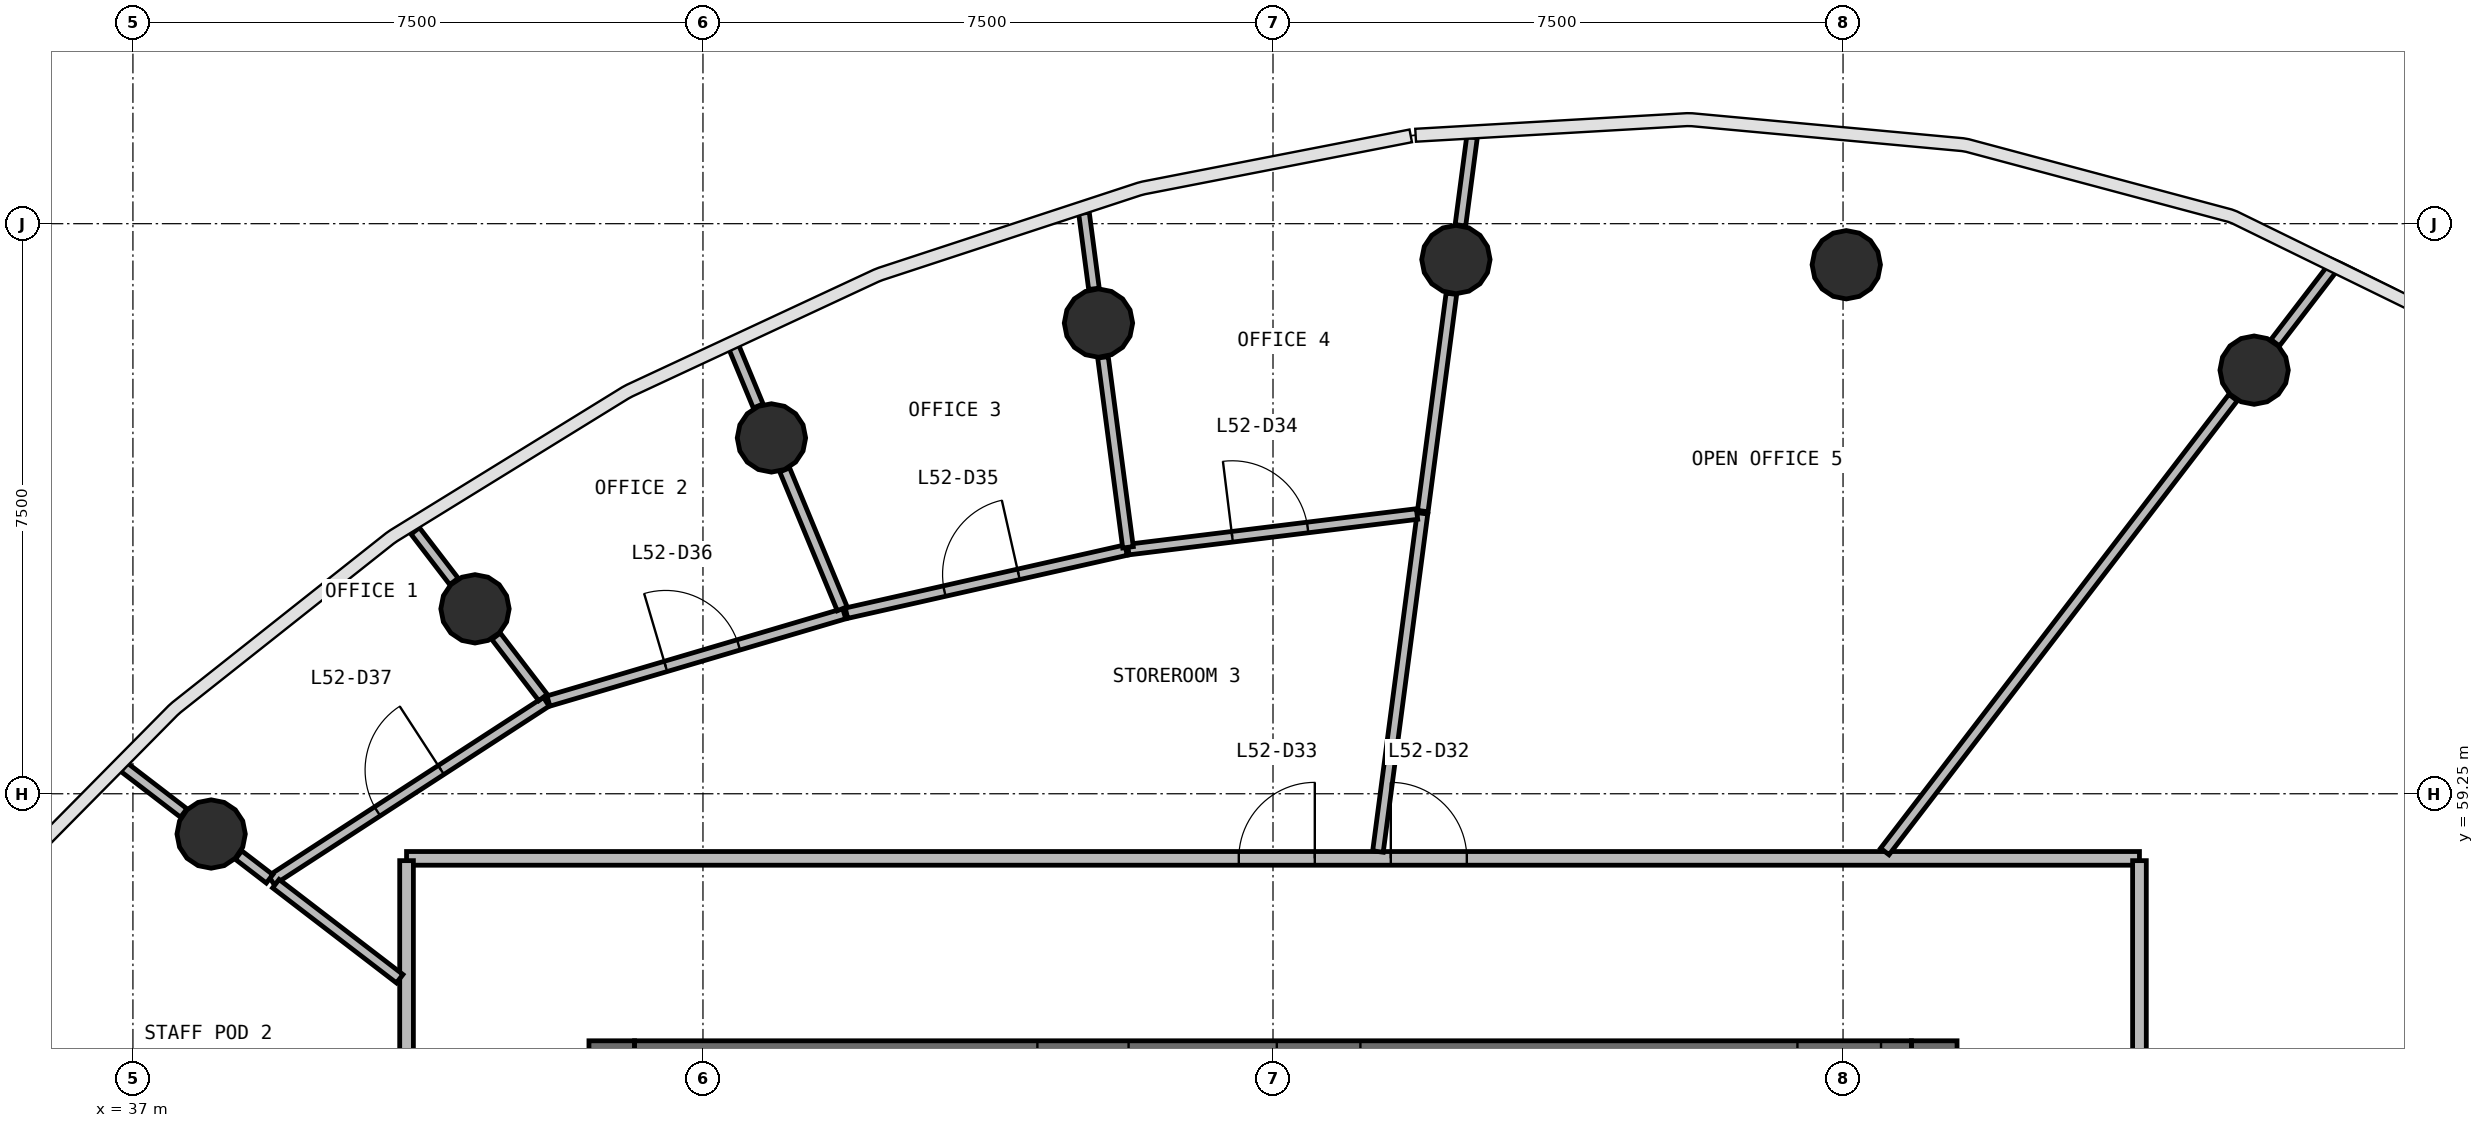
"""IFC4 building model, lengths in metres.
Left out: names, types, materials, properties, quantities, classifications, styles, units other than length and angle.
Written with IfcOpenShell. Run it as: python <this file> out.ifc"""

import sys

from ifc_helpers import new_model, si_unit, direction, frame, frame_2d, origin, origin_2d, place, context, subcontext, project, spatial, rectangle, circle, extrude, source, transform, mapped, element, fill, save


model = new_model("IFC4")
c1 = context("Model", 3, precision=1e-05, world=origin(), true_north=direction((0.0, 1.0)))
c2 = subcontext(c1, "Body", "Model", "MODEL_VIEW")
j1 = project(units=[si_unit("LENGTHUNIT", "METRE"), si_unit("PLANEANGLEUNIT", "RADIAN")], contexts=[c1])
p1 = place(None, origin())
s1 = spatial("IfcSite", under=j1, at=p1, CompositionType="ELEMENT")
p2 = place(p1, origin())
s2 = spatial("IfcBuilding", under=s1, at=p2, CompositionType="ELEMENT")
p3 = place(p2, frame((0.0, 0.0, 215.0)))
s3 = spatial("IfcBuildingStorey", under=s2, at=p3, CompositionType="ELEMENT", Elevation=215.0)
p4 = place(p3, frame((60.7, 40.0, 0.0), z_axis=(0.0, 0.0, 1.0), x_axis=(0.0, 1.0, 0.0)))
e1 = element("IfcWall", 1, at=p4, inside=s3, PredefinedType="SHEAR", context=c2, shape_type="SweptSolid", body=[
    extrude(rectangle(XDim=16.0, YDim=0.6, at=frame_2d((8.0, 0.0))), origin(), (0.0, 0.0, 1.0), 3.9),
])
p5 = place(p4, frame((7.1, 0.0, 0.0)))
e2 = element("IfcOpeningElement", 2, at=p5, cuts=e1, PredefinedType="OPENING", context=c2, shape_type="SweptSolid", body=[
    extrude(rectangle(XDim=1.8, YDim=2.1, at=frame_2d((0.9, 1.05))), frame((0.0, 0.31, 0.0), z_axis=(0.0, -1.0, 0.0), x_axis=(1.0, 0.0, 0.0)), (0.0, 0.0, 1.0), 0.62),
])
p6 = place(p3, frame((43.3, 56.0, 0.0), z_axis=(0.0, 0.0, 1.0), x_axis=(0.0, -1.0, 0.0)))
e3 = element("IfcWall", 3, at=p6, inside=s3, PredefinedType="SHEAR", context=c2, shape_type="SweptSolid", body=[
    extrude(rectangle(XDim=16.0, YDim=0.6, at=frame_2d((8.0, 0.0))), origin(), (0.0, 0.0, 1.0), 3.9),
])
p7 = place(p6, frame((7.1, 0.0, 0.0)))
e4 = element("IfcOpeningElement", 4, at=p7, cuts=e3, PredefinedType="OPENING", context=c2, shape_type="SweptSolid", body=[
    extrude(rectangle(XDim=1.8, YDim=2.1, at=frame_2d((0.9, 1.05))), frame((0.0, 0.31, 0.0), z_axis=(0.0, -1.0, 0.0), x_axis=(1.0, 0.0, 0.0)), (0.0, 0.0, 1.0), 0.62),
])
p8 = place(p3, frame((60.4, 55.7, 0.0), z_axis=(0.0, 0.0, 1.0), x_axis=(-1.0, 0.0, 0.0)))
e5 = element("IfcWall", 5, at=p8, inside=s3, PredefinedType="SHEAR", context=c2, shape_type="SweptSolid", body=[
    extrude(rectangle(XDim=16.8, YDim=0.6, at=frame_2d((8.4, 0.0))), origin(), (0.0, 0.0, 1.0), 3.9),
])
p9 = place(p8, frame((0.4, 0.0, 0.0)))
e6 = element("IfcOpeningElement", 6, at=p9, cuts=e5, PredefinedType="OPENING", context=c2, shape_type="SweptSolid", body=[
    extrude(rectangle(XDim=1.1, YDim=2.1, at=frame_2d((0.55, 1.05))), frame((0.0, 0.31, 0.0), z_axis=(0.0, -1.0, 0.0), x_axis=(1.0, 0.0, 0.0)), (0.0, 0.0, 1.0), 0.62),
])
p10 = place(p8, frame((10.3, 0.0, 0.0)))
e7 = element("IfcOpeningElement", 7, at=p10, cuts=e5, PredefinedType="OPENING", context=c2, shape_type="SweptSolid", body=[
    extrude(rectangle(XDim=1.2, YDim=2.1, at=frame_2d((0.6, 1.05))), frame((0.0, 0.31, 0.0), z_axis=(0.0, -1.0, 0.0), x_axis=(1.0, 0.0, 0.0)), (0.0, 0.0, 1.0), 0.62),
])
p11 = place(p8, frame((7.25, 0.0, 0.0)))
e8 = element("IfcOpeningElement", 8, at=p11, cuts=e5, PredefinedType="OPENING", context=c2, shape_type="SweptSolid", body=[
    extrude(rectangle(XDim=1.1, YDim=2.1, at=frame_2d((0.55, 1.05))), frame((0.0, 0.31, 0.0), z_axis=(0.0, -1.0, 0.0), x_axis=(1.0, 0.0, 0.0)), (0.0, 0.0, 1.0), 0.62),
])
m1 = source(origin(), c2, "Body", "SweptSolid", [
    extrude(circle(Radius=0.45, at=origin_2d()), origin(), (0.0, 0.0, 1.0), 3.9),
])
for number, where, z_axis, x_axis in (
    (9, (64.909, 64.823, 0.0), (0.0, 0.0, 1.0), (1.0, 0.0, 0.0)),
    (10, (59.543, 66.21, 0.0), (0.0, 0.0, 1.0), (1.0, 0.0, 0.0)),
    (11, (54.406, 66.278, 0.0), (0.0, 0.0, 1.0), (1.0, 0.0, 0.0)),
    (12, (49.704, 65.442, 0.0), (0.0, 0.0, 1.0), (1.0, 0.0, 0.0)),
    (13, (45.401, 63.931, 0.0), (0.0, 0.0, 1.0), (1.0, 0.0, 0.0)),
    (14, (41.501, 61.683, 0.0), (0.0, 0.0, 1.0), (1.0, 0.0, 0.0)),
    (15, (38.029, 58.72, 0.0), (0.0, 0.0, 1.0), (1.0, 0.0, 0.0)),
):
    element("IfcColumn", number, at=place(p3, frame(where, z_axis=z_axis, x_axis=x_axis)), inside=s3, PredefinedType="COLUMN", context=c2, shape_type="MappedRepresentation", body=[
        mapped(m1, transform((0.0, 0.0, 0.0), scale=1.0)),
    ])
p12 = place(p3, frame((40.6, 58.4, 0.0), z_axis=(0.0, 0.0, 1.0), x_axis=(1.0, 0.0, 0.0)))
e16 = element("IfcWall", 16, at=p12, inside=s3, PredefinedType="PARTITIONING", context=c2, shape_type="SweptSolid", body=[
    extrude(rectangle(XDim=22.8, YDim=0.18, at=frame_2d((11.4, 0.0))), origin(), (0.0, 0.0, 1.0), 2.88),
])
p13 = place(p12, frame((12.95, 0.0, 0.0)))
e17 = element("IfcOpeningElement", 17, at=p13, cuts=e16, PredefinedType="OPENING", context=c2, shape_type="SweptSolid", body=[
    extrude(rectangle(XDim=1.0, YDim=2.1, at=frame_2d((0.5, 1.05))), frame((0.0, 0.1, 0.0), z_axis=(0.0, -1.0, 0.0), x_axis=(1.0, 0.0, 0.0)), (0.0, 0.0, 1.0), 0.2),
])
p14 = place(p12, frame((10.95, 0.0, 0.0)))
e18 = element("IfcOpeningElement", 18, at=p14, cuts=e16, PredefinedType="OPENING", context=c2, shape_type="SweptSolid", body=[
    extrude(rectangle(XDim=1.0, YDim=2.1, at=frame_2d((0.5, 1.05))), frame((0.0, 0.1, 0.0), z_axis=(0.0, -1.0, 0.0), x_axis=(1.0, 0.0, 0.0)), (0.0, 0.0, 1.0), 0.2),
])
p15 = place(p3, frame((63.4, 58.37, 0.0), z_axis=(0.0, 0.0, 1.0), x_axis=(0.0, -1.0, 0.0)))
e19 = element("IfcWall", 19, at=p15, inside=s3, PredefinedType="PARTITIONING", context=c2, shape_type="SweptSolid", body=[
    extrude(rectangle(XDim=20.74, YDim=0.18, at=frame_2d((10.37, 0.0))), origin(), (0.0, 0.0, 1.0), 2.88),
])
p16 = place(p15, frame((12.09, 0.0, 0.0)))
e20 = element("IfcOpeningElement", 20, at=p16, cuts=e19, PredefinedType="OPENING", context=c2, shape_type="SweptSolid", body=[
    extrude(rectangle(XDim=1.0, YDim=2.1, at=frame_2d((0.5, 1.05))), frame((0.0, 0.1, 0.0), z_axis=(0.0, -1.0, 0.0), x_axis=(1.0, 0.0, 0.0)), (0.0, 0.0, 1.0), 0.2),
])
p17 = place(p15, frame((9.89, 0.0, 0.0)))
e21 = element("IfcOpeningElement", 21, at=p17, cuts=e19, PredefinedType="OPENING", context=c2, shape_type="SweptSolid", body=[
    extrude(rectangle(XDim=1.0, YDim=2.1, at=frame_2d((0.5, 1.05))), frame((0.0, 0.1, 0.0), z_axis=(0.0, -1.0, 0.0), x_axis=(1.0, 0.0, 0.0)), (0.0, 0.0, 1.0), 0.2),
])
p18 = place(p15, frame((4.29, 0.0, 0.0)))
e22 = element("IfcOpeningElement", 22, at=p18, cuts=e19, PredefinedType="OPENING", context=c2, shape_type="SweptSolid", body=[
    extrude(rectangle(XDim=1.0, YDim=2.1, at=frame_2d((0.5, 1.05))), frame((0.0, 0.1, 0.0), z_axis=(0.0, -1.0, 0.0), x_axis=(1.0, 0.0, 0.0)), (0.0, 0.0, 1.0), 0.2),
])
p19 = place(p3, frame((40.6, 37.63, 0.0), z_axis=(0.0, 0.0, 1.0), x_axis=(0.0, 1.0, 0.0)))
e23 = element("IfcWall", 23, at=p19, inside=s3, PredefinedType="PARTITIONING", context=c2, shape_type="SweptSolid", body=[
    extrude(rectangle(XDim=20.74, YDim=0.18, at=frame_2d((10.37, 0.0))), origin(), (0.0, 0.0, 1.0), 2.88),
])
p20 = place(p19, frame((15.49, 0.0, 0.0)))
e24 = element("IfcOpeningElement", 24, at=p20, cuts=e23, PredefinedType="OPENING", context=c2, shape_type="SweptSolid", body=[
    extrude(rectangle(XDim=1.0, YDim=2.1, at=frame_2d((0.5, 1.05))), frame((0.0, 0.1, 0.0), z_axis=(0.0, -1.0, 0.0), x_axis=(1.0, 0.0, 0.0)), (0.0, 0.0, 1.0), 0.2),
])
p21 = place(p19, frame((9.89, 0.0, 0.0)))
e25 = element("IfcOpeningElement", 25, at=p21, cuts=e23, PredefinedType="OPENING", context=c2, shape_type="SweptSolid", body=[
    extrude(rectangle(XDim=1.0, YDim=2.1, at=frame_2d((0.5, 1.05))), frame((0.0, 0.1, 0.0), z_axis=(0.0, -1.0, 0.0), x_axis=(1.0, 0.0, 0.0)), (0.0, 0.0, 1.0), 0.2),
])
p22 = place(p3, frame((63.49, 52.759, 0.0), z_axis=(0.0, 0.0, 1.0), x_axis=(0.923877866197, 0.382687455178, 0.0)))
e26 = element("IfcWall", 26, at=p22, inside=s3, PredefinedType="PARTITIONING", context=c2, shape_type="SweptSolid", body=[
    extrude(rectangle(XDim=9.571, YDim=0.14, at=frame_2d((4.786, 0.0))), origin(), (0.0, 0.0, 1.0), 2.88),
])
p23 = place(p3, frame((60.049, 58.49, 0.0), z_axis=(0.0, 0.0, 1.0), x_axis=(0.608758977351, 0.793355221508, 0.0)))
e27 = element("IfcWall", 27, at=p23, inside=s3, PredefinedType="PARTITIONING", context=c2, shape_type="SweptSolid", body=[
    extrude(rectangle(XDim=7.528, YDim=0.14, at=frame_2d((3.764, 0.0))), origin(), (0.0, 0.0, 1.0), 2.88),
])
p24 = place(p3, frame((53.381, 58.49, 0.0), z_axis=(0.0, 0.0, 1.0), x_axis=(0.130513619035, 0.991446516584, 0.0)))
e28 = element("IfcWall", 28, at=p24, inside=s3, PredefinedType="PARTITIONING", context=c2, shape_type="SweptSolid", body=[
    extrude(rectangle(XDim=4.488, YDim=0.14, at=frame_2d((2.244, 0.0))), origin(), (0.0, 0.0, 1.0), 2.88),
])
p25 = place(p3, frame((38.821, 58.112, 0.0), z_axis=(0.0, 0.0, 1.0), x_axis=(0.838669882541, 0.544640090444, 0.0)))
e29 = element("IfcWall", 29, at=p25, inside=s3, PredefinedType="PARTITIONING", context=c2, shape_type="SweptSolid", body=[
    extrude(rectangle(XDim=4.313, YDim=0.14, at=frame_2d((2.156, 0.0))), origin(), (0.0, 0.0, 1.0), 2.88),
])
p26 = place(p25, frame((1.663, 0.0, 0.0)))
e30 = element("IfcOpeningElement", 30, at=p26, cuts=e29, PredefinedType="OPENING", context=c2, shape_type="SweptSolid", body=[
    extrude(rectangle(XDim=1.0, YDim=2.1, at=frame_2d((0.5, 1.05))), frame((0.0, 0.08, 0.0), z_axis=(0.0, -1.0, 0.0), x_axis=(1.0, 0.0, 0.0)), (0.0, 0.0, 1.0), 0.16),
])
p27 = place(p3, frame((42.467, 60.47, 0.0), z_axis=(0.0, 0.0, 1.0), x_axis=(0.959068964017, 0.283172601532, 0.0)))
e31 = element("IfcWall", 31, at=p27, inside=s3, PredefinedType="PARTITIONING", context=c2, shape_type="SweptSolid", body=[
    extrude(rectangle(XDim=4.058, YDim=0.14, at=frame_2d((2.029, 0.0))), origin(), (0.0, 0.0, 1.0), 2.88),
])
p28 = place(p27, frame((1.608, 0.0, 0.0)))
e32 = element("IfcOpeningElement", 32, at=p28, cuts=e31, PredefinedType="OPENING", context=c2, shape_type="SweptSolid", body=[
    extrude(rectangle(XDim=1.0, YDim=2.1, at=frame_2d((0.5, 1.05))), frame((0.0, 0.08, 0.0), z_axis=(0.0, -1.0, 0.0), x_axis=(1.0, 0.0, 0.0)), (0.0, 0.0, 1.0), 0.16),
])
p29 = place(p3, frame((50.096, 62.462, 0.0), z_axis=(0.0, 0.0, 1.0), x_axis=(0.992497085358, 0.122268293338, 0.0)))
e33 = element("IfcWall", 33, at=p29, inside=s3, PredefinedType="PARTITIONING", context=c2, shape_type="SweptSolid", body=[
    extrude(rectangle(XDim=3.828, YDim=0.14, at=frame_2d((1.914, 0.0))), origin(), (0.0, 0.0, 1.0), 2.88),
])
p30 = place(p29, frame((1.378, 0.0, 0.0)))
e34 = element("IfcOpeningElement", 34, at=p30, cuts=e33, PredefinedType="OPENING", context=c2, shape_type="SweptSolid", body=[
    extrude(rectangle(XDim=1.0, YDim=2.1, at=frame_2d((0.5, 1.05))), frame((0.0, 0.08, 0.0), z_axis=(0.0, -1.0, 0.0), x_axis=(1.0, 0.0, 0.0)), (0.0, 0.0, 1.0), 0.16),
])
p31 = place(p3, frame((46.388, 61.625, 0.0), z_axis=(0.0, 0.0, 1.0), x_axis=(0.975458049839, 0.220185360556, 0.0)))
e35 = element("IfcWall", 35, at=p31, inside=s3, PredefinedType="PARTITIONING", context=c2, shape_type="SweptSolid", body=[
    extrude(rectangle(XDim=3.771, YDim=0.14, at=frame_2d((1.885, 0.0))), origin(), (0.0, 0.0, 1.0), 2.88),
])
p32 = place(p31, frame((1.321, 0.0, 0.0)))
e36 = element("IfcOpeningElement", 36, at=p32, cuts=e35, PredefinedType="OPENING", context=c2, shape_type="SweptSolid", body=[
    extrude(rectangle(XDim=1.0, YDim=2.1, at=frame_2d((0.5, 1.05))), frame((0.0, 0.08, 0.0), z_axis=(0.0, -1.0, 0.0), x_axis=(1.0, 0.0, 0.0)), (0.0, 0.0, 1.0), 0.16),
])
p33 = place(p3, frame((53.971, 62.969, 0.0), z_axis=(0.0, 0.0, 1.0), x_axis=(0.130566218239, 0.991439591026, 0.0)))
e37 = element("IfcWall", 37, at=p33, inside=s3, PredefinedType="PARTITIONING", context=c2, shape_type="SweptSolid", body=[
    extrude(rectangle(XDim=2.883, YDim=0.14, at=frame_2d((1.442, 0.0))), origin(), (0.0, 0.0, 1.0), 2.88),
])
p34 = place(p3, frame((50.092, 62.492, 0.0), z_axis=(0.0, 0.0, 1.0), x_axis=(-0.130527151373, 0.991444735098, 0.0)))
e38 = element("IfcWall", 38, at=p34, inside=s3, PredefinedType="PARTITIONING", context=c2, shape_type="SweptSolid", body=[
    extrude(rectangle(XDim=2.521, YDim=0.14, at=frame_2d((1.261, 0.0))), origin(), (0.0, 0.0, 1.0), 2.88),
])
p35 = place(p3, frame((40.51, 56.817, 0.0), z_axis=(0.0, 0.0, 1.0), x_axis=(-0.793392079692, 0.608710939512, 0.0)))
e39 = element("IfcWall", 39, at=p35, inside=s3, PredefinedType="PARTITIONING", context=c2, shape_type="SweptSolid", body=[
    extrude(rectangle(XDim=2.054, YDim=0.14, at=frame_2d((1.027, 0.0))), origin(), (0.0, 0.0, 1.0), 2.88),
])
p36 = place(p3, frame((46.332, 61.684, 0.0), z_axis=(0.0, 0.0, 1.0), x_axis=(-0.382686140255, 0.923878410862, 0.0)))
e40 = element("IfcWall", 40, at=p36, inside=s3, PredefinedType="PARTITIONING", context=c2, shape_type="SweptSolid", body=[
    extrude(rectangle(XDim=1.978, YDim=0.14, at=frame_2d((0.989, 0.0))), origin(), (0.0, 0.0, 1.0), 2.88),
])
p37 = place(p3, frame((65.186, 65.184, 0.0), z_axis=(0.0, 0.0, 1.0), x_axis=(0.608673156435, 0.793421066417, 0.0)))
e41 = element("IfcWall", 41, at=p37, inside=s3, PredefinedType="PARTITIONING", context=c2, shape_type="SweptSolid", body=[
    extrude(rectangle(XDim=1.251, YDim=0.14, at=frame_2d((0.626, 0.0))), origin(), (0.0, 0.0, 1.0), 2.88),
])
p38 = place(p3, frame((54.466, 66.729, 0.0), z_axis=(0.0, 0.0, 1.0), x_axis=(0.130562588112, 0.991440069084, 0.0)))
e42 = element("IfcWall", 42, at=p38, inside=s3, PredefinedType="PARTITIONING", context=c2, shape_type="SweptSolid", body=[
    extrude(rectangle(XDim=1.169, YDim=0.14, at=frame_2d((0.584, 0.0))), origin(), (0.0, 0.0, 1.0), 2.88),
])
p39 = place(p3, frame((42.396, 60.517, 0.0), z_axis=(0.0, 0.0, 1.0), x_axis=(-0.608734333178, 0.793374130919, 0.0)))
e43 = element("IfcWall", 43, at=p39, inside=s3, PredefinedType="PARTITIONING", context=c2, shape_type="SweptSolid", body=[
    extrude(rectangle(XDim=1.015, YDim=0.14, at=frame_2d((0.508, 0.0))), origin(), (0.0, 0.0, 1.0), 2.88),
])
p40 = place(p3, frame((49.644, 65.893, 0.0), z_axis=(0.0, 0.0, 1.0), x_axis=(-0.130416888508, 0.991459245351, 0.0)))
e44 = element("IfcWall", 44, at=p40, inside=s3, PredefinedType="PARTITIONING", context=c2, shape_type="SweptSolid", body=[
    extrude(rectangle(XDim=1.007, YDim=0.14, at=frame_2d((0.503, 0.0))), origin(), (0.0, 0.0, 1.0), 2.88),
])
p41 = place(p3, frame((37.668, 58.997, 0.0), z_axis=(0.0, 0.0, 1.0), x_axis=(-0.793419984166, 0.608674567176, 0.0)))
e45 = element("IfcWall", 45, at=p41, inside=s3, PredefinedType="PARTITIONING", context=c2, shape_type="SweptSolid", body=[
    extrude(rectangle(XDim=0.991, YDim=0.14, at=frame_2d((0.496, 0.0))), origin(), (0.0, 0.0, 1.0), 2.88),
])
p42 = place(p3, frame((45.227, 64.352, 0.0), z_axis=(0.0, 0.0, 1.0), x_axis=(-0.382488701461, 0.923960168651, 0.0)))
e46 = element("IfcWall", 46, at=p42, inside=s3, PredefinedType="PARTITIONING", context=c2, shape_type="SweptSolid", body=[
    extrude(rectangle(XDim=0.84, YDim=0.14, at=frame_2d((0.42, 0.0))), origin(), (0.0, 0.0, 1.0), 2.88),
])
p43 = place(p3, frame((41.224, 62.044, 0.0), z_axis=(0.0, 0.0, 1.0), x_axis=(-0.609006416532, 0.793165294641, 0.0)))
e47 = element("IfcWall", 47, at=p43, inside=s3, PredefinedType="PARTITIONING", context=c2, shape_type="SweptSolid", body=[
    extrude(rectangle(XDim=0.838, YDim=0.14, at=frame_2d((0.419, 0.0))), origin(), (0.0, 0.0, 1.0), 2.88),
])
p44 = place(p3, frame((38.798, 58.131, 0.0), z_axis=(0.0, 0.0, 1.0), x_axis=(-0.793399979609, 0.608700642645, 0.0)))
e48 = element("IfcWall", 48, at=p44, inside=s3, PredefinedType="PARTITIONING", context=c2, shape_type="SweptSolid", body=[
    extrude(rectangle(XDim=0.514, YDim=0.14, at=frame_2d((0.257, 0.0))), origin(), (0.0, 0.0, 1.0), 2.88),
])
m2 = source(origin(), c2, "Body", "SweptSolid", [
    extrude(rectangle(XDim=1.0, YDim=2.1, at=frame_2d((0.5, 1.05))), frame((0.0, 0.025, 0.0), z_axis=(0.0, -1.0, 0.0), x_axis=(1.0, 0.0, 0.0)), (0.0, 0.0, 1.0), 0.05),
])
p45 = place(p13, origin())
e49 = element("IfcDoor", 49, at=p45, inside=s3, OperationType="SINGLE_SWING_LEFT", PredefinedType="DOOR", context=c2, shape_type="MappedRepresentation", body=[
    mapped(m2, transform((0.0, 0.0, 0.0), scale=1.0)),
])
fill(e17, e49)
p46 = place(p14, origin())
e50 = element("IfcDoor", 50, at=p46, inside=s3, OperationType="SINGLE_SWING_RIGHT", PredefinedType="DOOR", context=c2, shape_type="MappedRepresentation", body=[
    mapped(m2, transform((0.0, 0.0, 0.0), scale=1.0)),
])
fill(e18, e50)
p47 = place(p30, origin())
e51 = element("IfcDoor", 51, at=p47, inside=s3, OperationType="SINGLE_SWING_LEFT", PredefinedType="DOOR", context=c2, shape_type="MappedRepresentation", body=[
    mapped(m2, transform((0.0, 0.0, 0.0), scale=1.0)),
])
fill(e34, e51)
p48 = place(p32, origin())
e52 = element("IfcDoor", 52, at=p48, inside=s3, OperationType="SINGLE_SWING_RIGHT", PredefinedType="DOOR", context=c2, shape_type="MappedRepresentation", body=[
    mapped(m2, transform((0.0, 0.0, 0.0), scale=1.0)),
])
fill(e36, e52)
p49 = place(p28, origin())
e53 = element("IfcDoor", 53, at=p49, inside=s3, OperationType="SINGLE_SWING_LEFT", PredefinedType="DOOR", context=c2, shape_type="MappedRepresentation", body=[
    mapped(m2, transform((0.0, 0.0, 0.0), scale=1.0)),
])
fill(e32, e53)
p50 = place(p26, origin())
e54 = element("IfcDoor", 54, at=p50, inside=s3, OperationType="SINGLE_SWING_RIGHT", PredefinedType="DOOR", context=c2, shape_type="MappedRepresentation", body=[
    mapped(m2, transform((0.0, 0.0, 0.0), scale=1.0)),
])
fill(e30, e54)
save(model, sys.argv[1])
